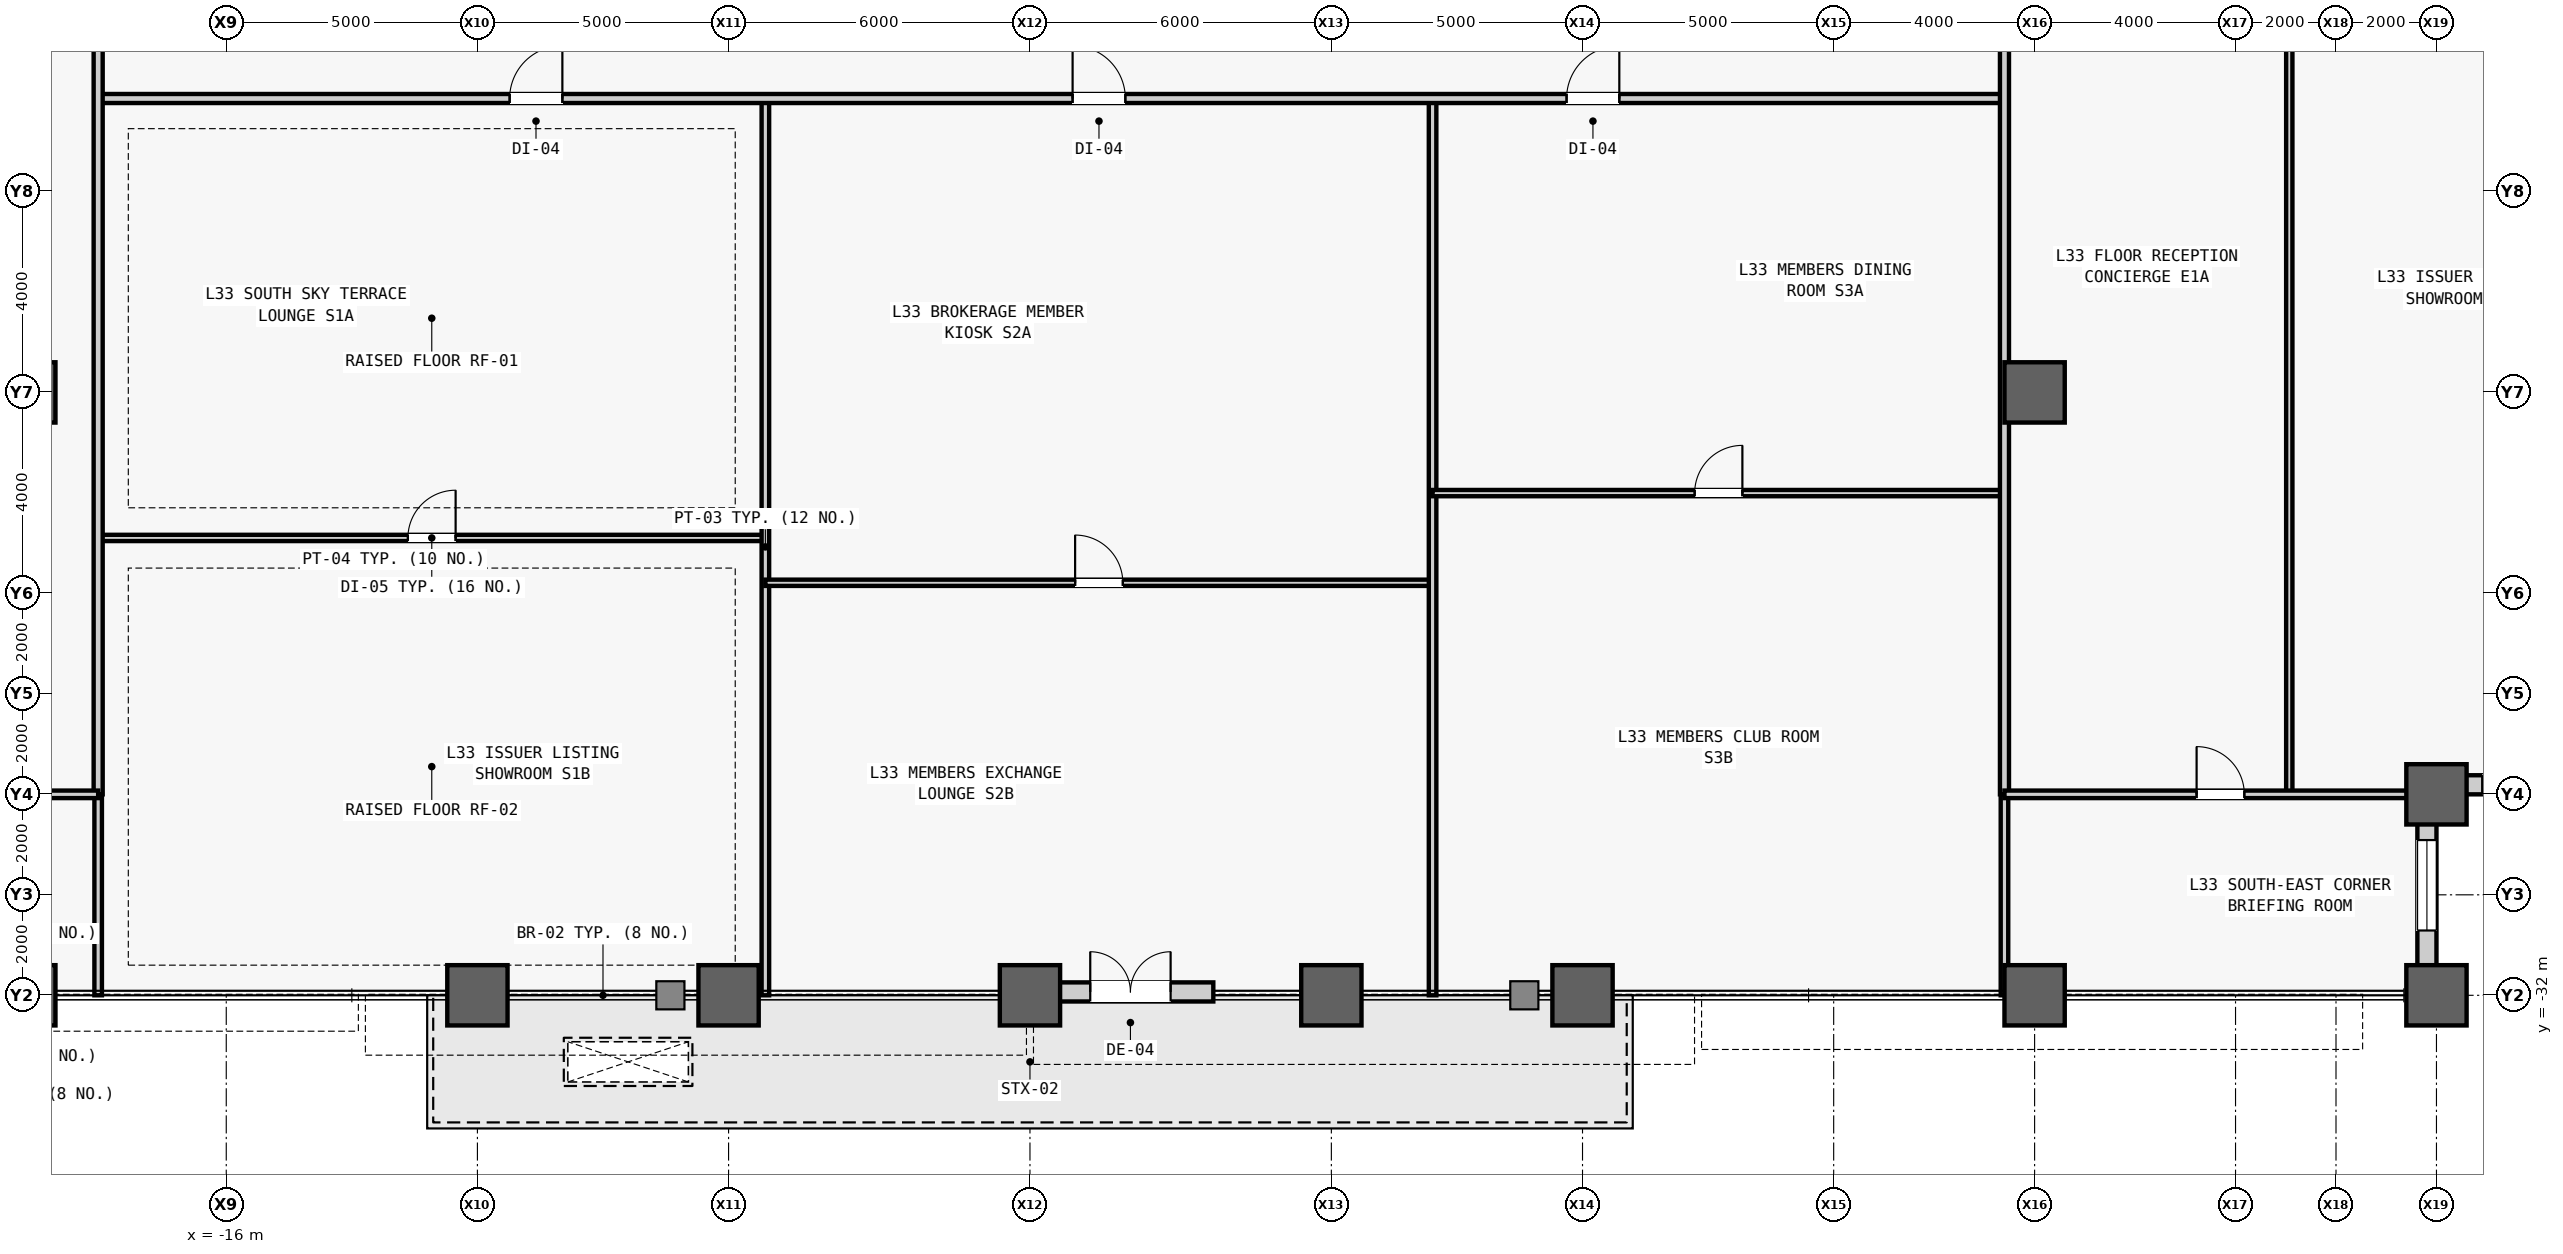
"""IFC4 building model, lengths in metres.
Left out: names, types, materials, properties, quantities, classifications, styles, units other than length and angle.
Written with IfcOpenShell. Run it as: python <this file> out.ifc"""

import sys

from ifc_helpers import new_model, si_unit, direction, frame, frame_2d, origin, origin_2d, place, context, subcontext, project, spatial, rectangle, hollow_rectangle, extrude, source, transform, mapped, element, fill, save


model = new_model("IFC4")
c1 = context("Model", 3, precision=1e-05, world=origin(), true_north=direction((0.0, 1.0)))
c2 = subcontext(c1, "Body", "Model", "MODEL_VIEW")
j1 = project(units=[si_unit("LENGTHUNIT", "METRE"), si_unit("PLANEANGLEUNIT", "RADIAN")], contexts=[c1])
p1 = place(None, origin())
s1 = spatial("IfcSite", under=j1, at=p1, CompositionType="ELEMENT")
p2 = place(p1, origin())
s2 = spatial("IfcBuilding", under=s1, at=p2, CompositionType="ELEMENT")
p3 = place(p2, frame((0.0, 0.0, 144.7)))
s3 = spatial("IfcBuildingStorey", under=s2, at=p3, CompositionType="ELEMENT", Elevation=144.7)
m1 = source(origin(), c2, "Body", "SweptSolid", [
    extrude(hollow_rectangle(XDim=1.2, YDim=1.2, WallThickness=0.07, at=origin_2d()), origin(), (0.0, 0.0, 1.0), 5.2),
])
for number, where, z_axis, x_axis in (
    (1, (-20.0, -32.0, 0.0), (0.0, 0.0, 1.0), (1.0, 0.0, 0.0)),
    (2, (-20.0, -20.0, 0.0), (0.0, 0.0, 1.0), (1.0, 0.0, 0.0)),
    (3, (-11.0, -32.0, 0.0), (0.0, 0.0, 1.0), (1.0, 0.0, 0.0)),
    (4, (-6.0, -32.0, 0.0), (0.0, 0.0, 1.0), (1.0, 0.0, 0.0)),
    (5, (0.0, -32.0, 0.0), (0.0, 0.0, 1.0), (1.0, 0.0, 0.0)),
    (6, (6.0, -32.0, 0.0), (0.0, 0.0, 1.0), (1.0, 0.0, 0.0)),
    (7, (11.0, -32.0, 0.0), (0.0, 0.0, 1.0), (1.0, 0.0, 0.0)),
    (8, (20.0, -32.0, 0.0), (0.0, 0.0, 1.0), (1.0, 0.0, 0.0)),
    (9, (20.0, -20.0, 0.0), (0.0, 0.0, 1.0), (1.0, 0.0, 0.0)),
    (10, (28.0, -32.0, 0.0), (0.0, 0.0, 1.0), (1.0, 0.0, 0.0)),
    (11, (28.0, -28.0, 0.0), (0.0, 0.0, 1.0), (1.0, 0.0, 0.0)),
):
    element("IfcColumn", number, at=place(p3, frame(where, z_axis=z_axis, x_axis=x_axis)), inside=s3, PredefinedType="COLUMN", context=c2, shape_type="MappedRepresentation", body=[
        mapped(m1, transform((0.0, 0.0, 0.0), scale=1.0)),
    ])
m2 = source(origin(), c2, "Body", "SweptSolid", [
    extrude(rectangle(XDim=3.62, YDim=0.38, at=frame_2d((1.81, 0.0))), origin(), (0.0, 0.0, 1.0), 3.905),
])
p4 = place(p3, frame((27.81, -31.62, 0.0), z_axis=(0.0, 0.0, 1.0), x_axis=(0.0, 1.0, 0.0)))
e12 = element("IfcWall", 12, at=p4, inside=s3, PredefinedType="STANDARD", context=c2, shape_type="MappedRepresentation", body=[
    mapped(m2, transform((0.0, 0.0, 0.0), scale=1.0)),
])
m3 = source(origin(), c2, "Body", "SweptSolid", [
    extrude(rectangle(XDim=1.8, YDim=2.4, at=frame_2d((0.9, 1.2))), frame((0.0, 0.2, 0.0), z_axis=(0.0, -1.0, 0.0), x_axis=(1.0, 0.0, 0.0)), (0.0, 0.0, 1.0), 0.4),
])
p5 = place(p4, frame((0.91, 0.0, 0.7)))
e13 = element("IfcOpeningElement", 13, at=p5, cuts=e12, PredefinedType="OPENING", context=c2, shape_type="MappedRepresentation", body=[
    mapped(m3, transform((0.0, 0.0, 0.0), scale=1.0)),
])
p6 = place(p3, frame((28.0, -27.81, 0.0), z_axis=(0.0, 0.0, 1.0), x_axis=(1.0, 0.0, 0.0)))
e14 = element("IfcWall", 14, at=p6, inside=s3, PredefinedType="STANDARD", context=c2, shape_type="MappedRepresentation", body=[
    mapped(m2, transform((0.0, 0.0, 0.0), scale=1.0)),
])
p7 = place(p6, frame((0.91, 0.0, 0.7)))
e15 = element("IfcOpeningElement", 15, at=p7, cuts=e14, PredefinedType="OPENING", context=c2, shape_type="MappedRepresentation", body=[
    mapped(m3, transform((0.0, 0.0, 0.0), scale=1.0)),
])
m4 = source(origin(), c2, "Body", "SweptSolid", [
    extrude(rectangle(XDim=3.3, YDim=0.38, at=frame_2d((1.65, 0.0))), origin(), (0.0, 0.0, 1.0), 3.905),
])
p8 = place(p3, frame((0.35, -31.933, 0.0), z_axis=(0.0, 0.0, 1.0), x_axis=(1.0, 0.0, 0.0)))
e16 = element("IfcWall", 16, at=p8, inside=s3, PredefinedType="STANDARD", context=c2, shape_type="MappedRepresentation", body=[
    mapped(m4, transform((0.0, 0.0, 0.0), scale=1.0)),
])
m5 = source(origin(), c2, "Body", "SweptSolid", [
    extrude(rectangle(XDim=1.6, YDim=2.25, at=frame_2d((0.8, 1.125))), frame((0.0, 0.2, 0.0), z_axis=(0.0, -1.0, 0.0), x_axis=(1.0, 0.0, 0.0)), (0.0, 0.0, 1.0), 0.4),
])
p9 = place(p8, frame((0.85, 0.0, 0.0)))
e17 = element("IfcOpeningElement", 17, at=p9, cuts=e16, PredefinedType="OPENING", context=c2, shape_type="MappedRepresentation", body=[
    mapped(m5, transform((0.0, 0.0, 0.0), scale=1.0)),
])
m6 = source(origin(), c2, "Body", "SweptSolid", [
    extrude(rectangle(XDim=13.282, YDim=0.125, at=frame_2d((6.641, 0.0))), origin(), (0.0, 0.0, 1.0), 4.6),
])
p10 = place(p3, frame((-18.55, -22.896, 0.0), z_axis=(0.0, 0.0, 1.0), x_axis=(1.0, 0.0, 0.0)))
e18 = element("IfcWall", 18, at=p10, inside=s3, PredefinedType="PARTITIONING", context=c2, shape_type="MappedRepresentation", body=[
    mapped(m6, transform((0.0, 0.0, 0.0), scale=1.0)),
])
m7 = source(origin(), c2, "Body", "SweptSolid", [
    extrude(rectangle(XDim=0.95, YDim=2.15, at=frame_2d((0.475, 1.075))), frame((0.0, 0.073, 0.0), z_axis=(0.0, -1.0, 0.0), x_axis=(1.0, 0.0, 0.0)), (0.0, 0.0, 1.0), 0.145),
])
p11 = place(p10, frame((6.166, 0.0, 0.0)))
e19 = element("IfcOpeningElement", 19, at=p11, cuts=e18, PredefinedType="OPENING", context=c2, shape_type="MappedRepresentation", body=[
    mapped(m7, transform((0.0, 0.0, 0.0), scale=1.0)),
])
m8 = source(origin(), c2, "Body", "SweptSolid", [
    extrude(rectangle(XDim=17.85, YDim=0.15, at=frame_2d((8.925, 0.0))), origin(), (0.0, 0.0, 1.0), 4.6),
])
p12 = place(p3, frame((-5.268, -32.0, 0.0), z_axis=(0.0, 0.0, 1.0), x_axis=(0.0, 1.0, 0.0)))
e20 = element("IfcWall", 20, at=p12, inside=s3, PredefinedType="PARTITIONING", context=c2, shape_type="MappedRepresentation", body=[
    mapped(m8, transform((0.0, 0.0, 0.0), scale=1.0)),
])
p13 = place(p3, frame((-5.268, -23.789, 0.0), z_axis=(0.0, 0.0, 1.0), x_axis=(1.0, 0.0, 0.0)))
e21 = element("IfcWall", 21, at=p13, inside=s3, PredefinedType="PARTITIONING", context=c2, shape_type="MappedRepresentation", body=[
    mapped(m6, transform((0.0, 0.0, 0.0), scale=1.0)),
])
p14 = place(p13, frame((6.166, 0.0, 0.0)))
e22 = element("IfcOpeningElement", 22, at=p14, cuts=e21, PredefinedType="OPENING", context=c2, shape_type="MappedRepresentation", body=[
    mapped(m7, transform((0.0, 0.0, 0.0), scale=1.0)),
])
p15 = place(p3, frame((8.015, -32.0, 0.0), z_axis=(0.0, 0.0, 1.0), x_axis=(0.0, 1.0, 0.0)))
e23 = element("IfcWall", 23, at=p15, inside=s3, PredefinedType="PARTITIONING", context=c2, shape_type="MappedRepresentation", body=[
    mapped(m8, transform((0.0, 0.0, 0.0), scale=1.0)),
])
m9 = source(origin(), c2, "Body", "SweptSolid", [
    extrude(rectangle(XDim=11.385, YDim=0.125, at=frame_2d((5.692, 0.0))), origin(), (0.0, 0.0, 1.0), 4.6),
])
p16 = place(p3, frame((8.015, -22.004, 0.0), z_axis=(0.0, 0.0, 1.0), x_axis=(1.0, 0.0, 0.0)))
e24 = element("IfcWall", 24, at=p16, inside=s3, PredefinedType="PARTITIONING", context=c2, shape_type="MappedRepresentation", body=[
    mapped(m9, transform((0.0, 0.0, 0.0), scale=1.0)),
])
p17 = place(p16, frame((5.218, 0.0, 0.0)))
e25 = element("IfcOpeningElement", 25, at=p17, cuts=e24, PredefinedType="OPENING", context=c2, shape_type="MappedRepresentation", body=[
    mapped(m7, transform((0.0, 0.0, 0.0), scale=1.0)),
])
m10 = source(origin(), c2, "Body", "SweptSolid", [
    extrude(rectangle(XDim=37.95, YDim=0.18, at=frame_2d((18.975, 0.0))), origin(), (0.0, 0.0, 1.0), 4.6),
])
p18 = place(p3, frame((-18.55, -14.15, 0.0), z_axis=(0.0, 0.0, 1.0), x_axis=(1.0, 0.0, 0.0)))
e26 = element("IfcWall", 26, at=p18, inside=s3, PredefinedType="PARTITIONING", context=c2, shape_type="MappedRepresentation", body=[
    mapped(m10, transform((0.0, 0.0, 0.0), scale=1.0)),
])
m11 = source(origin(), c2, "Body", "SweptSolid", [
    extrude(rectangle(XDim=1.05, YDim=2.2, at=frame_2d((0.525, 1.1))), frame((0.0, 0.1, 0.0), z_axis=(0.0, -1.0, 0.0), x_axis=(1.0, 0.0, 0.0)), (0.0, 0.0, 1.0), 0.2),
])
p19 = place(p18, frame((8.191, 0.0, 0.0)))
e27 = element("IfcOpeningElement", 27, at=p19, cuts=e26, PredefinedType="OPENING", context=c2, shape_type="MappedRepresentation", body=[
    mapped(m11, transform((0.0, 0.0, 0.0), scale=1.0)),
])
p20 = place(p18, frame((19.399, 0.0, 0.0)))
e28 = element("IfcOpeningElement", 28, at=p20, cuts=e26, PredefinedType="OPENING", context=c2, shape_type="MappedRepresentation", body=[
    mapped(m11, transform((0.0, 0.0, 0.0), scale=1.0)),
])
p21 = place(p18, frame((29.232, 0.0, 0.0)))
e29 = element("IfcOpeningElement", 29, at=p21, cuts=e26, PredefinedType="OPENING", context=c2, shape_type="MappedRepresentation", body=[
    mapped(m11, transform((0.0, 0.0, 0.0), scale=1.0)),
])
m12 = source(origin(), c2, "Body", "SweptSolid", [
    extrude(rectangle(XDim=4.0, YDim=0.15, at=frame_2d((2.0, 0.0))), origin(), (0.0, 0.0, 1.0), 4.6),
])
for number, where, z_axis, x_axis in (
    (30, (-18.55, -32.0, 0.0), (0.0, 0.0, 1.0), (0.0, 1.0, 0.0)),
    (31, (19.4, -32.0, 0.0), (0.0, 0.0, 1.0), (0.0, 1.0, 0.0)),
):
    element("IfcWall", number, at=place(p3, frame(where, z_axis=z_axis, x_axis=x_axis)), inside=s3, PredefinedType="PARTITIONING", context=c2, shape_type="MappedRepresentation", body=[
        mapped(m12, transform((0.0, 0.0, 0.0), scale=1.0)),
    ])
m13 = source(origin(), c2, "Body", "SweptSolid", [
    extrude(rectangle(XDim=56.0, YDim=0.18, at=frame_2d((28.0, 0.0))), origin(), (0.0, 0.0, 1.0), 4.6),
])
p22 = place(p3, frame((-18.55, -28.0, 0.0), z_axis=(0.0, 0.0, 1.0), x_axis=(0.0, 1.0, 0.0)))
e32 = element("IfcWall", 32, at=p22, inside=s3, PredefinedType="PARTITIONING", context=c2, shape_type="MappedRepresentation", body=[
    mapped(m13, transform((0.0, 0.0, 0.0), scale=1.0)),
])
m14 = source(origin(), c2, "Body", "SweptSolid", [
    extrude(rectangle(XDim=0.95, YDim=2.15, at=frame_2d((0.475, 1.075))), frame((0.0, 0.1, 0.0), z_axis=(0.0, -1.0, 0.0), x_axis=(1.0, 0.0, 0.0)), (0.0, 0.0, 1.0), 0.2),
])
p23 = place(p22, frame((27.25, 0.0, 0.0)))
e33 = element("IfcOpeningElement", 33, at=p23, cuts=e32, PredefinedType="OPENING", context=c2, shape_type="MappedRepresentation", body=[
    mapped(m14, transform((0.0, 0.0, 0.0), scale=1.0)),
])
m15 = source(origin(), c2, "Body", "SweptSolid", [
    extrude(rectangle(XDim=27.17, YDim=0.125, at=frame_2d((13.585, 0.0))), origin(), (0.0, 0.0, 1.0), 2.8),
])
p24 = place(p3, frame((25.07, -28.0, 0.0), z_axis=(0.0, 0.0, 1.0), x_axis=(0.0, 1.0, 0.0)))
e34 = element("IfcWall", 34, at=p24, inside=s3, PredefinedType="PARTITIONING", context=c2, shape_type="MappedRepresentation", body=[
    mapped(m15, transform((0.0, 0.0, 0.0), scale=1.0)),
])
p25 = place(p24, frame((20.035, 0.0, 0.0)))
e35 = element("IfcOpeningElement", 35, at=p25, cuts=e34, PredefinedType="OPENING", context=c2, shape_type="MappedRepresentation", body=[
    mapped(m7, transform((0.0, 0.0, 0.0), scale=1.0)),
])
m16 = source(origin(), c2, "Body", "SweptSolid", [
    extrude(rectangle(XDim=56.0, YDim=0.18, at=frame_2d((28.0, 0.0))), origin(), (0.0, 0.0, 1.0), 4.131),
])
p26 = place(p3, frame((19.4, -28.0, 0.0), z_axis=(0.0, 0.0, 1.0), x_axis=(0.0, 1.0, 0.0)))
e36 = element("IfcWall", 36, at=p26, inside=s3, PredefinedType="PARTITIONING", context=c2, shape_type="MappedRepresentation", body=[
    mapped(m16, transform((0.0, 0.0, 0.0), scale=1.0)),
])
p27 = place(p26, frame((20.335, 0.0, 0.0)))
e37 = element("IfcOpeningElement", 37, at=p27, cuts=e36, PredefinedType="OPENING", context=c2, shape_type="MappedRepresentation", body=[
    mapped(m14, transform((0.0, 0.0, 0.0), scale=1.0)),
])
p28 = place(p26, frame((33.61, 0.0, 0.0)))
e38 = element("IfcOpeningElement", 38, at=p28, cuts=e36, PredefinedType="OPENING", context=c2, shape_type="MappedRepresentation", body=[
    mapped(m14, transform((0.0, 0.0, 0.0), scale=1.0)),
])
m17 = source(origin(), c2, "Body", "SweptSolid", [
    extrude(rectangle(XDim=9.45, YDim=0.15, at=frame_2d((4.725, 0.0))), origin(), (0.0, 0.0, 1.0), 4.6),
])
p29 = place(p3, frame((-28.0, -28.0, 0.0), z_axis=(0.0, 0.0, 1.0), x_axis=(1.0, 0.0, 0.0)))
e39 = element("IfcWall", 39, at=p29, inside=s3, PredefinedType="PARTITIONING", context=c2, shape_type="MappedRepresentation", body=[
    mapped(m17, transform((0.0, 0.0, 0.0), scale=1.0)),
])
m18 = source(origin(), c2, "Body", "SweptSolid", [
    extrude(rectangle(XDim=0.95, YDim=2.15, at=frame_2d((0.475, 1.075))), frame((0.0, 0.085, 0.0), z_axis=(0.0, -1.0, 0.0), x_axis=(1.0, 0.0, 0.0)), (0.0, 0.0, 1.0), 0.17),
])
p30 = place(p29, frame((4.25, 0.0, 0.0)))
e40 = element("IfcOpeningElement", 40, at=p30, cuts=e39, PredefinedType="OPENING", context=c2, shape_type="MappedRepresentation", body=[
    mapped(m18, transform((0.0, 0.0, 0.0), scale=1.0)),
])
m19 = source(origin(), c2, "Body", "SweptSolid", [
    extrude(rectangle(XDim=8.6, YDim=0.15, at=frame_2d((4.3, 0.0))), origin(), (0.0, 0.0, 1.0), 4.6),
])
p31 = place(p3, frame((19.4, -28.0, 0.0), z_axis=(0.0, 0.0, 1.0), x_axis=(1.0, 0.0, 0.0)))
e41 = element("IfcWall", 41, at=p31, inside=s3, PredefinedType="PARTITIONING", context=c2, shape_type="MappedRepresentation", body=[
    mapped(m19, transform((0.0, 0.0, 0.0), scale=1.0)),
])
p32 = place(p31, frame((3.825, 0.0, 0.0)))
e42 = element("IfcOpeningElement", 42, at=p32, cuts=e41, PredefinedType="OPENING", context=c2, shape_type="MappedRepresentation", body=[
    mapped(m18, transform((0.0, 0.0, 0.0), scale=1.0)),
])
m20 = source(origin(), c2, "Body", "SweptSolid", [
    extrude(rectangle(XDim=1.8, YDim=2.4, at=frame_2d((0.9, 1.2))), frame((0.0, 0.03, 0.0), z_axis=(0.0, -1.0, 0.0), x_axis=(1.0, 0.0, 0.0)), (0.0, 0.0, 1.0), 0.06),
])
p33 = place(p5, origin())
e43 = element("IfcWindow", 43, at=p33, inside=s3, PartitioningType="SINGLE_PANEL", PredefinedType="WINDOW", context=c2, shape_type="MappedRepresentation", body=[
    mapped(m20, transform((0.0, 0.0, 0.0), scale=1.0)),
])
fill(e13, e43)
p34 = place(p7, origin())
e44 = element("IfcWindow", 44, at=p34, inside=s3, PartitioningType="SINGLE_PANEL", PredefinedType="WINDOW", context=c2, shape_type="MappedRepresentation", body=[
    mapped(m20, transform((0.0, 0.0, 0.0), scale=1.0)),
])
fill(e15, e44)
m21 = source(origin(), c2, "Body", "SweptSolid", [
    extrude(rectangle(XDim=1.6, YDim=2.25, at=frame_2d((0.8, 1.125))), frame((0.0, 0.025, 0.0), z_axis=(0.0, -1.0, 0.0), x_axis=(1.0, 0.0, 0.0)), (0.0, 0.0, 1.0), 0.05),
])
p35 = place(p9, origin())
e45 = element("IfcDoor", 45, at=p35, inside=s3, OperationType="DOUBLE_DOOR_SINGLE_SWING", PredefinedType="DOOR", context=c2, shape_type="MappedRepresentation", body=[
    mapped(m21, transform((0.0, 0.0, 0.0), scale=1.0)),
])
fill(e17, e45)
m22 = source(origin(), c2, "Body", "SweptSolid", [
    extrude(rectangle(XDim=0.95, YDim=2.15, at=frame_2d((0.475, 1.075))), frame((0.0, 0.025, 0.0), z_axis=(0.0, -1.0, 0.0), x_axis=(1.0, 0.0, 0.0)), (0.0, 0.0, 1.0), 0.05),
])
p36 = place(p11, origin())
e46 = element("IfcDoor", 46, at=p36, inside=s3, OperationType="SINGLE_SWING_RIGHT", PredefinedType="DOOR", context=c2, shape_type="MappedRepresentation", body=[
    mapped(m22, transform((0.0, 0.0, 0.0), scale=1.0)),
])
fill(e19, e46)
p37 = place(p14, origin())
e47 = element("IfcDoor", 47, at=p37, inside=s3, OperationType="SINGLE_SWING_LEFT", PredefinedType="DOOR", context=c2, shape_type="MappedRepresentation", body=[
    mapped(m22, transform((0.0, 0.0, 0.0), scale=1.0)),
])
fill(e22, e47)
p38 = place(p17, origin())
e48 = element("IfcDoor", 48, at=p38, inside=s3, OperationType="SINGLE_SWING_RIGHT", PredefinedType="DOOR", context=c2, shape_type="MappedRepresentation", body=[
    mapped(m22, transform((0.0, 0.0, 0.0), scale=1.0)),
])
fill(e25, e48)
m23 = source(origin(), c2, "Body", "SweptSolid", [
    extrude(rectangle(XDim=1.05, YDim=2.2, at=frame_2d((0.525, 1.1))), frame((0.0, 0.025, 0.0), z_axis=(0.0, -1.0, 0.0), x_axis=(1.0, 0.0, 0.0)), (0.0, 0.0, 1.0), 0.05),
])
p39 = place(p19, origin())
e49 = element("IfcDoor", 49, at=p39, inside=s3, OperationType="SINGLE_SWING_RIGHT", PredefinedType="DOOR", context=c2, shape_type="MappedRepresentation", body=[
    mapped(m23, transform((0.0, 0.0, 0.0), scale=1.0)),
])
fill(e27, e49)
p40 = place(p20, origin())
e50 = element("IfcDoor", 50, at=p40, inside=s3, OperationType="SINGLE_SWING_LEFT", PredefinedType="DOOR", context=c2, shape_type="MappedRepresentation", body=[
    mapped(m23, transform((0.0, 0.0, 0.0), scale=1.0)),
])
fill(e28, e50)
p41 = place(p21, origin())
e51 = element("IfcDoor", 51, at=p41, inside=s3, OperationType="SINGLE_SWING_RIGHT", PredefinedType="DOOR", context=c2, shape_type="MappedRepresentation", body=[
    mapped(m23, transform((0.0, 0.0, 0.0), scale=1.0)),
])
fill(e29, e51)
p42 = place(p32, origin())
e52 = element("IfcDoor", 52, at=p42, inside=s3, OperationType="SINGLE_SWING_LEFT", PredefinedType="DOOR", context=c2, shape_type="MappedRepresentation", body=[
    mapped(m22, transform((0.0, 0.0, 0.0), scale=1.0)),
])
fill(e42, e52)
save(model, sys.argv[1])
